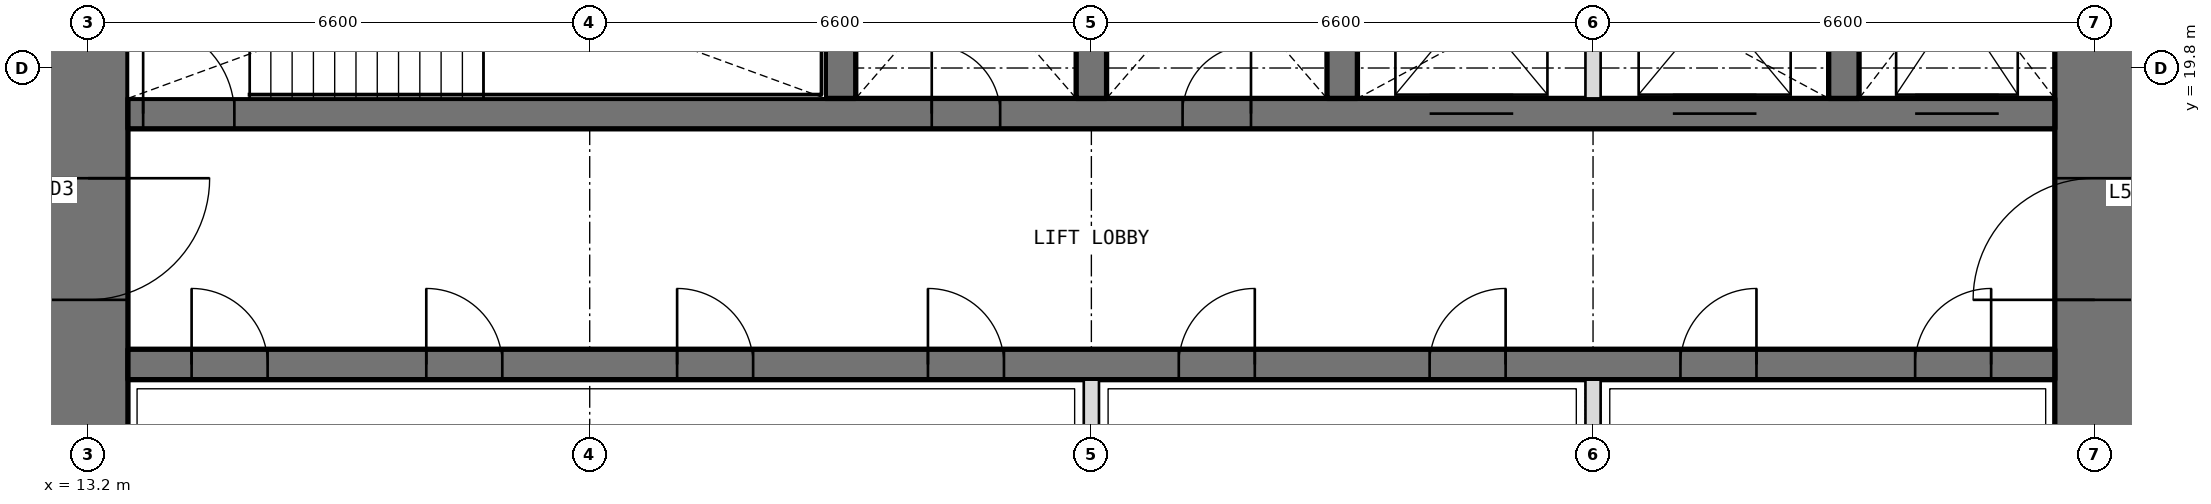
"""IFC4 building model, lengths in metres.
Left out: names, types, materials, properties, quantities, classifications, styles, units other than length and angle.
Written with IfcOpenShell. Run it as: python <this file> out.ifc"""

import sys

from ifc_helpers import new_model, si_unit, direction, frame, frame_2d, origin, place, context, subcontext, project, spatial, rectangle, extrude, element, fill, save


model = new_model("IFC4")
c1 = context("Model", 3, precision=1e-05, world=origin(), true_north=direction((0.0, 1.0)))
c2 = subcontext(c1, "Body", "Model", "MODEL_VIEW")
j1 = project(units=[si_unit("LENGTHUNIT", "METRE"), si_unit("PLANEANGLEUNIT", "RADIAN")], contexts=[c1])
p1 = place(None, origin())
s1 = spatial("IfcSite", under=j1, at=p1, CompositionType="ELEMENT")
p2 = place(p1, origin())
s2 = spatial("IfcBuilding", under=s1, at=p2, CompositionType="ELEMENT")
p3 = place(p2, frame((0.0, 0.0, 254.4)))
s3 = spatial("IfcBuildingStorey", under=s2, at=p3, CompositionType="ELEMENT", Elevation=254.4)
p4 = place(p3, frame((39.6, 13.725, 0.0), z_axis=(0.0, 0.0, 1.0), x_axis=(0.0, 1.0, 0.0)))
e1 = element("IfcWall", 1, at=p4, inside=s3, PredefinedType="SHEAR", context=c2, shape_type="SweptSolid", body=[
    extrude(rectangle(XDim=18.75, YDim=1.05, at=frame_2d((9.375, 0.0))), origin(), (0.0, 0.0, 1.0), 4.2),
])
p5 = place(p4, frame((3.025, 0.0, 0.0)))
e2 = element("IfcOpeningElement", 2, at=p5, cuts=e1, PredefinedType="OPENING", context=c2, shape_type="SweptSolid", body=[
    extrude(rectangle(XDim=1.6, YDim=2.1, at=frame_2d((0.8, 1.05))), frame((0.0, 0.535, 0.0), z_axis=(0.0, -1.0, 0.0), x_axis=(1.0, 0.0, 0.0)), (0.0, 0.0, 1.0), 1.07),
])
p6 = place(p4, frame((13.825, 0.0, 0.0)))
e3 = element("IfcOpeningElement", 3, at=p6, cuts=e1, PredefinedType="OPENING", context=c2, shape_type="SweptSolid", body=[
    extrude(rectangle(XDim=1.6, YDim=2.1, at=frame_2d((0.8, 1.05))), frame((0.0, 0.535, 0.0), z_axis=(0.0, -1.0, 0.0), x_axis=(1.0, 0.0, 0.0)), (0.0, 0.0, 1.0), 1.07),
])
p7 = place(p3, frame((13.2, 32.475, 0.0), z_axis=(0.0, 0.0, 1.0), x_axis=(0.0, -1.0, 0.0)))
e4 = element("IfcWall", 4, at=p7, inside=s3, PredefinedType="SHEAR", context=c2, shape_type="SweptSolid", body=[
    extrude(rectangle(XDim=18.75, YDim=1.05, at=frame_2d((9.375, 0.0))), origin(), (0.0, 0.0, 1.0), 4.2),
])
p8 = place(p7, frame((14.125, 0.0, 0.0)))
e5 = element("IfcOpeningElement", 5, at=p8, cuts=e4, PredefinedType="OPENING", context=c2, shape_type="SweptSolid", body=[
    extrude(rectangle(XDim=1.6, YDim=2.1, at=frame_2d((0.8, 1.05))), frame((0.0, 0.535, 0.0), z_axis=(0.0, -1.0, 0.0), x_axis=(1.0, 0.0, 0.0)), (0.0, 0.0, 1.0), 1.07),
])
p9 = place(p7, frame((3.325, 0.0, 0.0)))
e6 = element("IfcOpeningElement", 6, at=p9, cuts=e4, PredefinedType="OPENING", context=c2, shape_type="SweptSolid", body=[
    extrude(rectangle(XDim=1.6, YDim=2.1, at=frame_2d((0.8, 1.05))), frame((0.0, 0.535, 0.0), z_axis=(0.0, -1.0, 0.0), x_axis=(1.0, 0.0, 0.0)), (0.0, 0.0, 1.0), 1.07),
])
p10 = place(p3, frame((13.725, 15.9, 0.0), z_axis=(0.0, 0.0, 1.0), x_axis=(1.0, 0.0, 0.0)))
e7 = element("IfcWall", 7, at=p10, inside=s3, PredefinedType="SHEAR", context=c2, shape_type="SweptSolid", body=[
    extrude(rectangle(XDim=25.35, YDim=0.4, at=frame_2d((12.675, 0.0))), origin(), (0.0, 0.0, 1.0), 4.2),
])
p11 = place(p10, frame((0.837, 0.0, 0.0)))
e8 = element("IfcOpeningElement", 8, at=p11, cuts=e7, PredefinedType="OPENING", context=c2, shape_type="SweptSolid", body=[
    extrude(rectangle(XDim=1.0, YDim=2.1, at=frame_2d((0.5, 1.05))), frame((0.0, 0.21, 0.0), z_axis=(0.0, -1.0, 0.0), x_axis=(1.0, 0.0, 0.0)), (0.0, 0.0, 1.0), 0.42),
])
p12 = place(p10, frame((3.925, 0.0, 0.0)))
e9 = element("IfcOpeningElement", 9, at=p12, cuts=e7, PredefinedType="OPENING", context=c2, shape_type="SweptSolid", body=[
    extrude(rectangle(XDim=1.0, YDim=2.1, at=frame_2d((0.5, 1.05))), frame((0.0, 0.21, 0.0), z_axis=(0.0, -1.0, 0.0), x_axis=(1.0, 0.0, 0.0)), (0.0, 0.0, 1.0), 0.42),
])
p13 = place(p10, frame((7.225, 0.0, 0.0)))
e10 = element("IfcOpeningElement", 10, at=p13, cuts=e7, PredefinedType="OPENING", context=c2, shape_type="SweptSolid", body=[
    extrude(rectangle(XDim=1.0, YDim=2.1, at=frame_2d((0.5, 1.05))), frame((0.0, 0.21, 0.0), z_axis=(0.0, -1.0, 0.0), x_axis=(1.0, 0.0, 0.0)), (0.0, 0.0, 1.0), 0.42),
])
p14 = place(p10, frame((10.525, 0.0, 0.0)))
e11 = element("IfcOpeningElement", 11, at=p14, cuts=e7, PredefinedType="OPENING", context=c2, shape_type="SweptSolid", body=[
    extrude(rectangle(XDim=1.0, YDim=2.1, at=frame_2d((0.5, 1.05))), frame((0.0, 0.21, 0.0), z_axis=(0.0, -1.0, 0.0), x_axis=(1.0, 0.0, 0.0)), (0.0, 0.0, 1.0), 0.42),
])
p15 = place(p10, frame((13.825, 0.0, 0.0)))
e12 = element("IfcOpeningElement", 12, at=p15, cuts=e7, PredefinedType="OPENING", context=c2, shape_type="SweptSolid", body=[
    extrude(rectangle(XDim=1.0, YDim=2.1, at=frame_2d((0.5, 1.05))), frame((0.0, 0.21, 0.0), z_axis=(0.0, -1.0, 0.0), x_axis=(1.0, 0.0, 0.0)), (0.0, 0.0, 1.0), 0.42),
])
p16 = place(p10, frame((17.125, 0.0, 0.0)))
e13 = element("IfcOpeningElement", 13, at=p16, cuts=e7, PredefinedType="OPENING", context=c2, shape_type="SweptSolid", body=[
    extrude(rectangle(XDim=1.0, YDim=2.1, at=frame_2d((0.5, 1.05))), frame((0.0, 0.21, 0.0), z_axis=(0.0, -1.0, 0.0), x_axis=(1.0, 0.0, 0.0)), (0.0, 0.0, 1.0), 0.42),
])
p17 = place(p10, frame((20.425, 0.0, 0.0)))
e14 = element("IfcOpeningElement", 14, at=p17, cuts=e7, PredefinedType="OPENING", context=c2, shape_type="SweptSolid", body=[
    extrude(rectangle(XDim=1.0, YDim=2.1, at=frame_2d((0.5, 1.05))), frame((0.0, 0.21, 0.0), z_axis=(0.0, -1.0, 0.0), x_axis=(1.0, 0.0, 0.0)), (0.0, 0.0, 1.0), 0.42),
])
p18 = place(p10, frame((23.512, 0.0, 0.0)))
e15 = element("IfcOpeningElement", 15, at=p18, cuts=e7, PredefinedType="OPENING", context=c2, shape_type="SweptSolid", body=[
    extrude(rectangle(XDim=1.0, YDim=2.1, at=frame_2d((0.5, 1.05))), frame((0.0, 0.21, 0.0), z_axis=(0.0, -1.0, 0.0), x_axis=(1.0, 0.0, 0.0)), (0.0, 0.0, 1.0), 0.42),
])
p19 = place(p3, frame((13.725, 19.2, 0.0), z_axis=(0.0, 0.0, 1.0), x_axis=(1.0, 0.0, 0.0)))
e16 = element("IfcWall", 16, at=p19, inside=s3, PredefinedType="SHEAR", context=c2, shape_type="SweptSolid", body=[
    extrude(rectangle(XDim=25.35, YDim=0.4, at=frame_2d((12.675, 0.0))), origin(), (0.0, 0.0, 1.0), 4.2),
])
p20 = place(p19, frame((10.575, 0.0, 0.0)))
e17 = element("IfcOpeningElement", 17, at=p20, cuts=e16, PredefinedType="OPENING", context=c2, shape_type="SweptSolid", body=[
    extrude(rectangle(XDim=0.9, YDim=2.1, at=frame_2d((0.45, 1.05))), frame((0.0, 0.21, 0.0), z_axis=(0.0, -1.0, 0.0), x_axis=(1.0, 0.0, 0.0)), (0.0, 0.0, 1.0), 0.42),
])
p21 = place(p19, frame((13.875, 0.0, 0.0)))
e18 = element("IfcOpeningElement", 18, at=p21, cuts=e16, PredefinedType="OPENING", context=c2, shape_type="SweptSolid", body=[
    extrude(rectangle(XDim=0.9, YDim=2.1, at=frame_2d((0.45, 1.05))), frame((0.0, 0.21, 0.0), z_axis=(0.0, -1.0, 0.0), x_axis=(1.0, 0.0, 0.0)), (0.0, 0.0, 1.0), 0.42),
])
p22 = place(p19, frame((0.2, 0.0, 0.0)))
e19 = element("IfcOpeningElement", 19, at=p22, cuts=e16, PredefinedType="OPENING", context=c2, shape_type="SweptSolid", body=[
    extrude(rectangle(XDim=1.2, YDim=2.1, at=frame_2d((0.6, 1.05))), frame((0.0, 0.21, 0.0), z_axis=(0.0, -1.0, 0.0), x_axis=(1.0, 0.0, 0.0)), (0.0, 0.0, 1.0), 0.42),
])
p23 = place(p19, frame((23.512, 0.0, 0.0)))
e20 = element("IfcOpeningElement", 20, at=p23, cuts=e16, PredefinedType="OPENING", context=c2, shape_type="SweptSolid", body=[
    extrude(rectangle(XDim=1.1, YDim=2.1, at=frame_2d((0.55, 1.05))), frame((0.0, 0.21, 0.0), z_axis=(0.0, -1.0, 0.0), x_axis=(1.0, 0.0, 0.0)), (0.0, 0.0, 1.0), 0.42),
])
p24 = place(p19, frame((17.125, 0.0, 0.0)))
e21 = element("IfcOpeningElement", 21, at=p24, cuts=e16, PredefinedType="OPENING", context=c2, shape_type="SweptSolid", body=[
    extrude(rectangle(XDim=1.1, YDim=2.1, at=frame_2d((0.55, 1.05))), frame((0.0, 0.21, 0.0), z_axis=(0.0, -1.0, 0.0), x_axis=(1.0, 0.0, 0.0)), (0.0, 0.0, 1.0), 0.42),
])
p25 = place(p19, frame((20.325, 0.0, 0.0)))
e22 = element("IfcOpeningElement", 22, at=p25, cuts=e16, PredefinedType="OPENING", context=c2, shape_type="SweptSolid", body=[
    extrude(rectangle(XDim=1.1, YDim=2.1, at=frame_2d((0.55, 1.05))), frame((0.0, 0.21, 0.0), z_axis=(0.0, -1.0, 0.0), x_axis=(1.0, 0.0, 0.0)), (0.0, 0.0, 1.0), 0.42),
])
for number, where, z_axis, x_axis in (
    (23, (23.1, 19.4, 0.0), (0.0, 0.0, 1.0), (0.0, 1.0, 0.0)),
    (24, (26.4, 19.4, 0.0), (0.0, 0.0, 1.0), (0.0, 1.0, 0.0)),
    (25, (29.7, 19.4, 0.0), (0.0, 0.0, 1.0), (0.0, 1.0, 0.0)),
    (26, (36.3, 19.4, 0.0), (0.0, 0.0, 1.0), (0.0, 1.0, 0.0)),
):
    element("IfcWall", number, at=place(p3, frame(where, z_axis=z_axis, x_axis=x_axis)), inside=s3, PredefinedType="SHEAR", context=c2, shape_type="SweptSolid", body=[
        extrude(rectangle(XDim=3.35, YDim=0.4, at=frame_2d((1.675, 0.0))), origin(), (0.0, 0.0, 1.0), 4.2),
    ])
for number, where, z_axis, x_axis in (
    (27, (26.4, 13.725, 0.0), (0.0, 0.0, 1.0), (0.0, 1.0, 0.0)),
    (28, (33.0, 13.725, 0.0), (0.0, 0.0, 1.0), (0.0, 1.0, 0.0)),
):
    element("IfcWall", number, at=place(p3, frame(where, z_axis=z_axis, x_axis=x_axis)), inside=s3, PredefinedType="PARTITIONING", context=c2, shape_type="SweptSolid", body=[
        extrude(rectangle(XDim=1.975, YDim=0.2, at=frame_2d((0.987, 0.0))), origin(), (0.0, 0.0, 1.0), 4.2),
    ])
p26 = place(p3, frame((33.0, 19.4, 0.0), z_axis=(0.0, 0.0, 1.0), x_axis=(0.0, 1.0, 0.0)))
e29 = element("IfcWall", 29, at=p26, inside=s3, PredefinedType="PARTITIONING", context=c2, shape_type="SweptSolid", body=[
    extrude(rectangle(XDim=3.35, YDim=0.2, at=frame_2d((1.675, 0.0))), origin(), (0.0, 0.0, 1.0), 4.2),
])
p27 = place(p20, origin())
e30 = element("IfcDoor", 30, at=p27, inside=s3, OperationType="SINGLE_SWING_LEFT", PredefinedType="DOOR", context=c2, shape_type="SweptSolid", body=[
    extrude(rectangle(XDim=0.9, YDim=2.1, at=frame_2d((0.45, 1.05))), frame((0.0, 0.025, 0.0), z_axis=(0.0, -1.0, 0.0), x_axis=(1.0, 0.0, 0.0)), (0.0, 0.0, 1.0), 0.05),
])
fill(e17, e30)
p28 = place(p21, origin())
e31 = element("IfcDoor", 31, at=p28, inside=s3, OperationType="SINGLE_SWING_RIGHT", PredefinedType="DOOR", context=c2, shape_type="SweptSolid", body=[
    extrude(rectangle(XDim=0.9, YDim=2.1, at=frame_2d((0.45, 1.05))), frame((0.0, 0.025, 0.0), z_axis=(0.0, -1.0, 0.0), x_axis=(1.0, 0.0, 0.0)), (0.0, 0.0, 1.0), 0.05),
])
fill(e18, e31)
p29 = place(p11, origin())
e32 = element("IfcDoor", 32, at=p29, inside=s3, OperationType="SINGLE_SWING_LEFT", PredefinedType="DOOR", context=c2, shape_type="SweptSolid", body=[
    extrude(rectangle(XDim=1.0, YDim=2.1, at=frame_2d((0.5, 1.05))), frame((0.0, 0.025, 0.0), z_axis=(0.0, -1.0, 0.0), x_axis=(1.0, 0.0, 0.0)), (0.0, 0.0, 1.0), 0.05),
])
fill(e8, e32)
p30 = place(p12, origin())
e33 = element("IfcDoor", 33, at=p30, inside=s3, OperationType="SINGLE_SWING_LEFT", PredefinedType="DOOR", context=c2, shape_type="SweptSolid", body=[
    extrude(rectangle(XDim=1.0, YDim=2.1, at=frame_2d((0.5, 1.05))), frame((0.0, 0.025, 0.0), z_axis=(0.0, -1.0, 0.0), x_axis=(1.0, 0.0, 0.0)), (0.0, 0.0, 1.0), 0.05),
])
fill(e9, e33)
p31 = place(p13, origin())
e34 = element("IfcDoor", 34, at=p31, inside=s3, OperationType="SINGLE_SWING_LEFT", PredefinedType="DOOR", context=c2, shape_type="SweptSolid", body=[
    extrude(rectangle(XDim=1.0, YDim=2.1, at=frame_2d((0.5, 1.05))), frame((0.0, 0.025, 0.0), z_axis=(0.0, -1.0, 0.0), x_axis=(1.0, 0.0, 0.0)), (0.0, 0.0, 1.0), 0.05),
])
fill(e10, e34)
p32 = place(p14, origin())
e35 = element("IfcDoor", 35, at=p32, inside=s3, OperationType="SINGLE_SWING_LEFT", PredefinedType="DOOR", context=c2, shape_type="SweptSolid", body=[
    extrude(rectangle(XDim=1.0, YDim=2.1, at=frame_2d((0.5, 1.05))), frame((0.0, 0.025, 0.0), z_axis=(0.0, -1.0, 0.0), x_axis=(1.0, 0.0, 0.0)), (0.0, 0.0, 1.0), 0.05),
])
fill(e11, e35)
p33 = place(p15, origin())
e36 = element("IfcDoor", 36, at=p33, inside=s3, OperationType="SINGLE_SWING_RIGHT", PredefinedType="DOOR", context=c2, shape_type="SweptSolid", body=[
    extrude(rectangle(XDim=1.0, YDim=2.1, at=frame_2d((0.5, 1.05))), frame((0.0, 0.025, 0.0), z_axis=(0.0, -1.0, 0.0), x_axis=(1.0, 0.0, 0.0)), (0.0, 0.0, 1.0), 0.05),
])
fill(e12, e36)
p34 = place(p16, origin())
e37 = element("IfcDoor", 37, at=p34, inside=s3, OperationType="SINGLE_SWING_RIGHT", PredefinedType="DOOR", context=c2, shape_type="SweptSolid", body=[
    extrude(rectangle(XDim=1.0, YDim=2.1, at=frame_2d((0.5, 1.05))), frame((0.0, 0.025, 0.0), z_axis=(0.0, -1.0, 0.0), x_axis=(1.0, 0.0, 0.0)), (0.0, 0.0, 1.0), 0.05),
])
fill(e13, e37)
p35 = place(p17, origin())
e38 = element("IfcDoor", 38, at=p35, inside=s3, OperationType="SINGLE_SWING_RIGHT", PredefinedType="DOOR", context=c2, shape_type="SweptSolid", body=[
    extrude(rectangle(XDim=1.0, YDim=2.1, at=frame_2d((0.5, 1.05))), frame((0.0, 0.025, 0.0), z_axis=(0.0, -1.0, 0.0), x_axis=(1.0, 0.0, 0.0)), (0.0, 0.0, 1.0), 0.05),
])
fill(e14, e38)
p36 = place(p18, origin())
e39 = element("IfcDoor", 39, at=p36, inside=s3, OperationType="SINGLE_SWING_RIGHT", PredefinedType="DOOR", context=c2, shape_type="SweptSolid", body=[
    extrude(rectangle(XDim=1.0, YDim=2.1, at=frame_2d((0.5, 1.05))), frame((0.0, 0.025, 0.0), z_axis=(0.0, -1.0, 0.0), x_axis=(1.0, 0.0, 0.0)), (0.0, 0.0, 1.0), 0.05),
])
fill(e15, e39)
p37 = place(p22, origin())
e40 = element("IfcDoor", 40, at=p37, inside=s3, OperationType="SINGLE_SWING_LEFT", PredefinedType="DOOR", context=c2, shape_type="SweptSolid", body=[
    extrude(rectangle(XDim=1.2, YDim=2.1, at=frame_2d((0.6, 1.05))), frame((0.0, 0.025, 0.0), z_axis=(0.0, -1.0, 0.0), x_axis=(1.0, 0.0, 0.0)), (0.0, 0.0, 1.0), 0.05),
])
fill(e19, e40)
p38 = place(p8, origin())
e41 = element("IfcDoor", 41, at=p38, inside=s3, OperationType="DOUBLE_DOOR_DOUBLE_SWING", PredefinedType="DOOR", context=c2, shape_type="SweptSolid", body=[
    extrude(rectangle(XDim=1.6, YDim=2.1, at=frame_2d((0.8, 1.05))), frame((0.0, 0.025, 0.0), z_axis=(0.0, -1.0, 0.0), x_axis=(1.0, 0.0, 0.0)), (0.0, 0.0, 1.0), 0.05),
])
fill(e5, e41)
p39 = place(p5, origin())
e42 = element("IfcDoor", 42, at=p39, inside=s3, OperationType="DOUBLE_DOOR_DOUBLE_SWING", PredefinedType="DOOR", context=c2, shape_type="SweptSolid", body=[
    extrude(rectangle(XDim=1.6, YDim=2.1, at=frame_2d((0.8, 1.05))), frame((0.0, 0.025, 0.0), z_axis=(0.0, -1.0, 0.0), x_axis=(1.0, 0.0, 0.0)), (0.0, 0.0, 1.0), 0.05),
])
fill(e2, e42)
p40 = place(p23, origin())
e43 = element("IfcDoor", 43, at=p40, inside=s3, OperationType="DOUBLE_DOOR_SLIDING", PredefinedType="DOOR", context=c2, shape_type="SweptSolid", body=[
    extrude(rectangle(XDim=1.1, YDim=2.1, at=frame_2d((0.55, 1.05))), frame((0.0, 0.025, 0.0), z_axis=(0.0, -1.0, 0.0), x_axis=(1.0, 0.0, 0.0)), (0.0, 0.0, 1.0), 0.05),
])
fill(e20, e43)
p41 = place(p24, origin())
e44 = element("IfcDoor", 44, at=p41, inside=s3, OperationType="DOUBLE_DOOR_SLIDING", PredefinedType="DOOR", context=c2, shape_type="SweptSolid", body=[
    extrude(rectangle(XDim=1.1, YDim=2.1, at=frame_2d((0.55, 1.05))), frame((0.0, 0.025, 0.0), z_axis=(0.0, -1.0, 0.0), x_axis=(1.0, 0.0, 0.0)), (0.0, 0.0, 1.0), 0.05),
])
fill(e21, e44)
p42 = place(p25, origin())
e45 = element("IfcDoor", 45, at=p42, inside=s3, OperationType="DOUBLE_DOOR_SLIDING", PredefinedType="DOOR", context=c2, shape_type="SweptSolid", body=[
    extrude(rectangle(XDim=1.1, YDim=2.1, at=frame_2d((0.55, 1.05))), frame((0.0, 0.025, 0.0), z_axis=(0.0, -1.0, 0.0), x_axis=(1.0, 0.0, 0.0)), (0.0, 0.0, 1.0), 0.05),
])
fill(e22, e45)
save(model, sys.argv[1])
